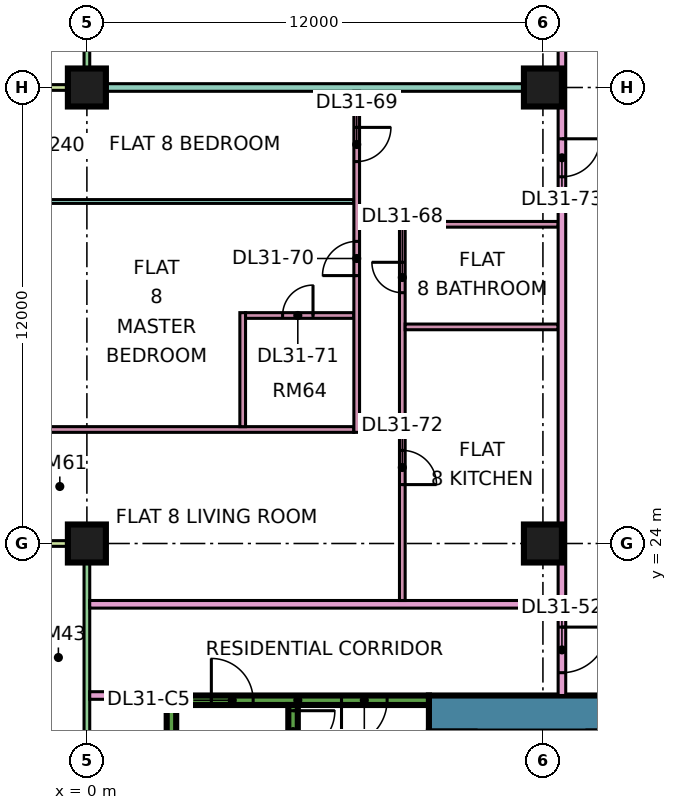
"""IFC4 building model, lengths in metres.
Left out: names, types, materials, properties, quantities, classifications, styles, units other than length and angle.
Written with IfcOpenShell. Run it as: python <this file> out.ifc"""

import sys

from ifc_helpers import new_model, si_unit, direction, frame, frame_2d, origin, origin_2d, place, context, subcontext, project, spatial, rectangle, extrude, element, fill, save


model = new_model("IFC4")
c1 = context("Model", 3, precision=1e-05, world=origin(), true_north=direction((0.0, 1.0)))
c2 = subcontext(c1, "Body", "Model", "MODEL_VIEW")
j1 = project(units=[si_unit("LENGTHUNIT", "METRE"), si_unit("PLANEANGLEUNIT", "RADIAN")], contexts=[c1])
p1 = place(None, origin())
s1 = spatial("IfcSite", under=j1, at=p1, CompositionType="ELEMENT")
p2 = place(p1, origin())
s2 = spatial("IfcBuilding", under=s1, at=p2, CompositionType="ELEMENT")
p3 = place(p2, frame((0.0, 0.0, 133.15)))
s3 = spatial("IfcBuildingStorey", under=s2, at=p3, CompositionType="ELEMENT", Elevation=133.15)
p4 = place(p3, frame((0.0, 24.0, 0.0), z_axis=(0.0, 0.0, 1.0), x_axis=(1.0, 0.0, 0.0)))
e1 = element("IfcColumn", 1, at=p4, inside=s3, PredefinedType="COLUMN", context=c2, shape_type="SweptSolid", body=[
    extrude(rectangle(XDim=1.0, YDim=1.0, at=origin_2d()), origin(), (0.0, 0.0, 1.0), 3.75),
])
p5 = place(p3, frame((0.0, 36.0, 0.0), z_axis=(0.0, 0.0, 1.0), x_axis=(1.0, 0.0, 0.0)))
e2 = element("IfcColumn", 2, at=p5, inside=s3, PredefinedType="COLUMN", context=c2, shape_type="SweptSolid", body=[
    extrude(rectangle(XDim=1.0, YDim=1.0, at=origin_2d()), origin(), (0.0, 0.0, 1.0), 3.75),
])
for number, where, z_axis, x_axis in (
    (3, (12.0, 24.0, 0.0), (0.0, 0.0, 1.0), (1.0, 0.0, 0.0)),
    (4, (12.0, 36.0, 0.0), (0.0, 0.0, 1.0), (1.0, 0.0, 0.0)),
):
    element("IfcColumn", number, at=place(p3, frame(where, z_axis=z_axis, x_axis=x_axis)), inside=s3, PredefinedType="COLUMN", context=c2, shape_type="SweptSolid", body=[
        extrude(rectangle(XDim=1.0, YDim=1.0, at=origin_2d()), origin(), (0.0, 0.0, 1.0), 3.75),
    ])
p6 = place(p3, frame((9.0, 19.525, 0.0), z_axis=(0.0, 0.0, 1.0), x_axis=(1.0, 0.0, 0.0)))
e5 = element("IfcWall", 5, at=p6, inside=s3, PredefinedType="SHEAR", context=c2, shape_type="SweptSolid", body=[
    extrude(rectangle(XDim=25.0, YDim=0.95, at=frame_2d((12.5, 0.0))), origin(), (0.0, 0.0, 1.0), 3.75),
])
p7 = place(p6, frame((19.1, 0.0, 0.0)))
e6 = element("IfcOpeningElement", 6, at=p7, cuts=e5, PredefinedType="OPENING", context=c2, shape_type="SweptSolid", body=[
    extrude(rectangle(XDim=1.8, YDim=2.4, at=frame_2d((0.9, 1.2))), frame((0.0, 0.485, 0.0), z_axis=(0.0, -1.0, 0.0), x_axis=(1.0, 0.0, 0.0)), (0.0, 0.0, 1.0), 0.97),
])
p8 = place(p3, frame((2.1, 19.875, 0.0), z_axis=(0.0, 0.0, 1.0), x_axis=(1.0, 0.0, 0.0)))
e7 = element("IfcWall", 7, at=p8, inside=s3, PredefinedType="SHEAR", context=c2, shape_type="SweptSolid", body=[
    extrude(rectangle(XDim=6.9, YDim=0.25, at=frame_2d((3.45, 0.0))), origin(), (0.0, 0.0, 1.0), 3.75),
])
p9 = place(p8, frame((1.175, 0.0, 0.0)))
e8 = element("IfcOpeningElement", 8, at=p9, cuts=e7, PredefinedType="OPENING", context=c2, shape_type="SweptSolid", body=[
    extrude(rectangle(XDim=1.1, YDim=2.2, at=frame_2d((0.55, 1.1))), frame((0.0, 0.135, 0.0), z_axis=(0.0, -1.0, 0.0), x_axis=(1.0, 0.0, 0.0)), (0.0, 0.0, 1.0), 0.27),
])
p10 = place(p8, frame((4.6, 0.0, 0.0)))
e9 = element("IfcOpeningElement", 9, at=p10, cuts=e7, PredefinedType="OPENING", context=c2, shape_type="SweptSolid", body=[
    extrude(rectangle(XDim=1.2, YDim=2.2, at=frame_2d((0.6, 1.1))), frame((0.0, 0.135, 0.0), z_axis=(0.0, -1.0, 0.0), x_axis=(1.0, 0.0, 0.0)), (0.0, 0.0, 1.0), 0.27),
])
p11 = place(p3, frame((2.225, 13.25, 0.0), z_axis=(0.0, 0.0, 1.0), x_axis=(0.0, 1.0, 0.0)))
e10 = element("IfcWall", 10, at=p11, inside=s3, PredefinedType="SHEAR", context=c2, shape_type="SweptSolid", body=[
    extrude(rectangle(XDim=6.5, YDim=0.25, at=frame_2d((3.25, 0.0))), origin(), (0.0, 0.0, 1.0), 3.75),
])
p12 = place(p3, frame((5.425, 13.25, 0.0), z_axis=(0.0, 0.0, 1.0), x_axis=(0.0, 1.0, 0.0)))
e11 = element("IfcWall", 11, at=p12, inside=s3, PredefinedType="SHEAR", context=c2, shape_type="SweptSolid", body=[
    extrude(rectangle(XDim=6.5, YDim=0.25, at=frame_2d((3.25, 0.0))), origin(), (0.0, 0.0, 1.0), 3.75),
])
p13 = place(p12, frame((5.25, 0.0, 0.0)))
e12 = element("IfcOpeningElement", 12, at=p13, cuts=e11, PredefinedType="OPENING", context=c2, shape_type="SweptSolid", body=[
    extrude(rectangle(XDim=1.1, YDim=2.2, at=frame_2d((0.55, 1.1))), frame((0.0, 0.135, 0.0), z_axis=(0.0, -1.0, 0.0), x_axis=(1.0, 0.0, 0.0)), (0.0, 0.0, 1.0), 0.27),
])
p14 = place(p3, frame((0.0, 47.925, 0.0), z_axis=(0.0, 0.0, 1.0), x_axis=(0.0, -1.0, 0.0)))
e13 = element("IfcWall", 13, at=p14, inside=s3, PredefinedType="SOLIDWALL", context=c2, shape_type="SweptSolid", body=[
    extrude(rectangle(XDim=11.85, YDim=0.15, at=frame_2d((5.925, 0.0))), origin(), (0.0, 0.0, 1.0), 3.35),
])
p15 = place(p14, frame((0.562, 0.0, 0.45)))
e14 = element("IfcOpeningElement", 14, at=p15, cuts=e13, PredefinedType="OPENING", context=c2, shape_type="SweptSolid", body=[
    extrude(rectangle(XDim=1.2, YDim=2.4, at=frame_2d((0.6, 1.2))), frame((0.0, 0.085, 0.0), z_axis=(0.0, -1.0, 0.0), x_axis=(1.0, 0.0, 0.0)), (0.0, 0.0, 1.0), 0.17),
])
p16 = place(p14, frame((4.125, 0.0, 0.0)))
e15 = element("IfcOpeningElement", 15, at=p16, cuts=e13, PredefinedType="OPENING", context=c2, shape_type="SweptSolid", body=[
    extrude(rectangle(XDim=1.2, YDim=2.4, at=frame_2d((0.6, 1.2))), frame((0.0, 0.085, 0.0), z_axis=(0.0, -1.0, 0.0), x_axis=(1.0, 0.0, 0.0)), (0.0, 0.0, 1.0), 0.17),
])
p17 = place(p14, frame((7.125, 0.0, 0.45)))
e16 = element("IfcOpeningElement", 16, at=p17, cuts=e13, PredefinedType="OPENING", context=c2, shape_type="SweptSolid", body=[
    extrude(rectangle(XDim=3.0, YDim=2.4, at=frame_2d((1.5, 1.2))), frame((0.0, 0.085, 0.0), z_axis=(0.0, -1.0, 0.0), x_axis=(1.0, 0.0, 0.0)), (0.0, 0.0, 1.0), 0.17),
])
p18 = place(p3, frame((-1.5, 36.0, 0.0), z_axis=(0.0, 0.0, 1.0), x_axis=(1.0, 0.0, 0.0)))
e17 = element("IfcWall", 17, at=p18, inside=s3, PredefinedType="SOLIDWALL", context=c2, shape_type="SweptSolid", body=[
    extrude(rectangle(XDim=1.5, YDim=0.15, at=frame_2d((0.75, 0.0))), origin(), (0.0, 0.0, 1.0), 3.35),
])
p19 = place(p3, frame((0.0, 23.925, 0.0), z_axis=(0.0, 0.0, 1.0), x_axis=(0.0, -1.0, 0.0)))
e18 = element("IfcWall", 18, at=p19, inside=s3, PredefinedType="SOLIDWALL", context=c2, shape_type="SweptSolid", body=[
    extrude(rectangle(XDim=11.35, YDim=0.15, at=frame_2d((5.675, 0.0))), origin(), (0.0, 0.0, 1.0), 3.35),
])
p20 = place(p19, frame((6.738, 0.0, 0.0)))
e19 = element("IfcOpeningElement", 19, at=p20, cuts=e18, PredefinedType="OPENING", context=c2, shape_type="SweptSolid", body=[
    extrude(rectangle(XDim=1.8, YDim=2.4, at=frame_2d((0.9, 1.2))), frame((0.0, 0.085, 0.0), z_axis=(0.0, -1.0, 0.0), x_axis=(1.0, 0.0, 0.0)), (0.0, 0.0, 1.0), 0.17),
])
p21 = place(p3, frame((-1.5, 24.0, 0.0), z_axis=(0.0, 0.0, 1.0), x_axis=(1.0, 0.0, 0.0)))
e20 = element("IfcWall", 20, at=p21, inside=s3, PredefinedType="SOLIDWALL", context=c2, shape_type="SweptSolid", body=[
    extrude(rectangle(XDim=1.5, YDim=0.15, at=frame_2d((0.75, 0.0))), origin(), (0.0, 0.0, 1.0), 3.35),
])
p22 = place(p3, frame((-1.351, 33.0, 0.0), z_axis=(0.0, 0.0, 1.0), x_axis=(1.0, 0.0, 0.0)))
e21 = element("IfcWall", 21, at=p22, inside=s3, PredefinedType="PARTITIONING", context=c2, shape_type="SweptSolid", body=[
    extrude(rectangle(XDim=8.376, YDim=0.1, at=frame_2d((4.188, 0.0))), origin(), (0.0, 0.0, 1.0), 3.35),
])
p23 = place(p3, frame((-1.35, 27.0, 0.0), z_axis=(0.0, 0.0, 1.0), x_axis=(1.0, 0.0, 0.0)))
e22 = element("IfcWall", 22, at=p23, inside=s3, PredefinedType="PARTITIONING", context=c2, shape_type="SweptSolid", body=[
    extrude(rectangle(XDim=8.375, YDim=0.15, at=frame_2d((4.188, 0.0))), origin(), (0.0, 0.0, 1.0), 3.35),
])
e23 = element("IfcWall", 23, at=p5, inside=s3, PredefinedType="PARTITIONING", context=c2, shape_type="SweptSolid", body=[
    extrude(rectangle(XDim=12.4, YDim=0.2, at=frame_2d((6.2, 0.0))), origin(), (0.0, 0.0, 1.0), 3.35),
])
p24 = place(p3, frame((0.074, 20.0, 0.0), z_axis=(0.0, 0.0, 1.0), x_axis=(1.0, 0.0, 0.0)))
e24 = element("IfcWall", 24, at=p24, inside=s3, PredefinedType="PARTITIONING", context=c2, shape_type="SweptSolid", body=[
    extrude(rectangle(XDim=2.026, YDim=0.2, at=frame_2d((1.013, 0.0))), origin(), (0.0, 0.0, 1.0), 3.35),
])
p25 = place(p3, frame((0.074, 22.4, 0.0), z_axis=(0.0, 0.0, 1.0), x_axis=(1.0, 0.0, 0.0)))
e25 = element("IfcWall", 25, at=p25, inside=s3, PredefinedType="PARTITIONING", context=c2, shape_type="SweptSolid", body=[
    extrude(rectangle(XDim=12.326, YDim=0.2, at=frame_2d((6.163, 0.0))), origin(), (0.0, 0.0, 1.0), 3.35),
])
p26 = place(p3, frame((4.1, 27.075, 0.0), z_axis=(0.0, 0.0, 1.0), x_axis=(0.0, 1.0, 0.0)))
e26 = element("IfcWall", 26, at=p26, inside=s3, PredefinedType="PARTITIONING", context=c2, shape_type="SweptSolid", body=[
    extrude(rectangle(XDim=3.0, YDim=0.15, at=frame_2d((1.5, 0.0))), origin(), (0.0, 0.0, 1.0), 3.35),
])
p27 = place(p3, frame((4.175, 30.0, 0.0), z_axis=(0.0, 0.0, 1.0), x_axis=(1.0, 0.0, 0.0)))
e27 = element("IfcWall", 27, at=p27, inside=s3, PredefinedType="PARTITIONING", context=c2, shape_type="SweptSolid", body=[
    extrude(rectangle(XDim=2.85, YDim=0.15, at=frame_2d((1.425, 0.0))), origin(), (0.0, 0.0, 1.0), 3.35),
])
p28 = place(p27, frame((0.975, 0.0, 0.0)))
e28 = element("IfcOpeningElement", 28, at=p28, cuts=e27, PredefinedType="OPENING", context=c2, shape_type="SweptSolid", body=[
    extrude(rectangle(XDim=0.8, YDim=2.1, at=frame_2d((0.4, 1.05))), frame((0.0, 0.085, 0.0), z_axis=(0.0, -1.0, 0.0), x_axis=(1.0, 0.0, 0.0)), (0.0, 0.0, 1.0), 0.17),
])
p29 = place(p3, frame((7.1, 26.925, 0.0), z_axis=(0.0, 0.0, 1.0), x_axis=(0.0, 1.0, 0.0)))
e29 = element("IfcWall", 29, at=p29, inside=s3, PredefinedType="PARTITIONING", context=c2, shape_type="SweptSolid", body=[
    extrude(rectangle(XDim=8.975, YDim=0.15, at=frame_2d((4.487, 0.0))), origin(), (0.0, 0.0, 1.0), 3.35),
])
p30 = place(p29, frame((7.125, 0.0, 0.0)))
e30 = element("IfcOpeningElement", 30, at=p30, cuts=e29, PredefinedType="OPENING", context=c2, shape_type="SweptSolid", body=[
    extrude(rectangle(XDim=0.9, YDim=2.1, at=frame_2d((0.45, 1.05))), frame((0.0, 0.085, 0.0), z_axis=(0.0, -1.0, 0.0), x_axis=(1.0, 0.0, 0.0)), (0.0, 0.0, 1.0), 0.17),
])
p31 = place(p29, frame((4.125, 0.0, 0.0)))
e31 = element("IfcOpeningElement", 31, at=p31, cuts=e29, PredefinedType="OPENING", context=c2, shape_type="SweptSolid", body=[
    extrude(rectangle(XDim=0.9, YDim=2.1, at=frame_2d((0.45, 1.05))), frame((0.0, 0.085, 0.0), z_axis=(0.0, -1.0, 0.0), x_axis=(1.0, 0.0, 0.0)), (0.0, 0.0, 1.0), 0.17),
])
p32 = place(p3, frame((8.3, 22.5, 0.0), z_axis=(0.0, 0.0, 1.0), x_axis=(0.0, 1.0, 0.0)))
e32 = element("IfcWall", 32, at=p32, inside=s3, PredefinedType="PARTITIONING", context=c2, shape_type="SweptSolid", body=[
    extrude(rectangle(XDim=9.975, YDim=0.15, at=frame_2d((4.988, 0.0))), origin(), (0.0, 0.0, 1.0), 3.35),
])
p33 = place(p32, frame((8.1, 0.0, 0.0)))
e33 = element("IfcOpeningElement", 33, at=p33, cuts=e32, PredefinedType="OPENING", context=c2, shape_type="SweptSolid", body=[
    extrude(rectangle(XDim=0.8, YDim=2.1, at=frame_2d((0.4, 1.05))), frame((0.0, 0.085, 0.0), z_axis=(0.0, -1.0, 0.0), x_axis=(1.0, 0.0, 0.0)), (0.0, 0.0, 1.0), 0.17),
])
p34 = place(p32, frame((3.05, 0.0, 0.0)))
e34 = element("IfcOpeningElement", 34, at=p34, cuts=e32, PredefinedType="OPENING", context=c2, shape_type="SweptSolid", body=[
    extrude(rectangle(XDim=0.9, YDim=2.1, at=frame_2d((0.45, 1.05))), frame((0.0, 0.085, 0.0), z_axis=(0.0, -1.0, 0.0), x_axis=(1.0, 0.0, 0.0)), (0.0, 0.0, 1.0), 0.17),
])
for number, where, z_axis, x_axis in (
    (35, (8.375, 29.7, 0.0), (0.0, 0.0, 1.0), (1.0, 0.0, 0.0)),
    (36, (8.375, 32.4, 0.0), (0.0, 0.0, 1.0), (1.0, 0.0, 0.0)),
):
    element("IfcWall", number, at=place(p3, frame(where, z_axis=z_axis, x_axis=x_axis)), inside=s3, PredefinedType="PARTITIONING", context=c2, shape_type="SweptSolid", body=[
        extrude(rectangle(XDim=4.025, YDim=0.15, at=frame_2d((2.012, 0.0))), origin(), (0.0, 0.0, 1.0), 3.35),
    ])
p35 = place(p3, frame((12.5, 20.0, 0.0), z_axis=(0.0, 0.0, 1.0), x_axis=(0.0, 1.0, 0.0)))
e37 = element("IfcWall", 37, at=p35, inside=s3, PredefinedType="PARTITIONING", context=c2, shape_type="SweptSolid", body=[
    extrude(rectangle(XDim=42.926, YDim=0.2, at=frame_2d((21.463, 0.0))), origin(), (0.0, 0.0, 1.0), 3.35),
])
p36 = place(p35, frame((17.25, 0.0, 0.0)))
e38 = element("IfcOpeningElement", 38, at=p36, cuts=e37, PredefinedType="OPENING", context=c2, shape_type="SweptSolid", body=[
    extrude(rectangle(XDim=1.0, YDim=2.1, at=frame_2d((0.5, 1.05))), frame((0.0, 0.11, 0.0), z_axis=(0.0, -1.0, 0.0), x_axis=(1.0, 0.0, 0.0)), (0.0, 0.0, 1.0), 0.22),
])
p37 = place(p35, frame((40.8, 0.0, 0.0)))
e39 = element("IfcOpeningElement", 39, at=p37, cuts=e37, PredefinedType="OPENING", context=c2, shape_type="SweptSolid", body=[
    extrude(rectangle(XDim=1.0, YDim=2.1, at=frame_2d((0.5, 1.05))), frame((0.0, 0.11, 0.0), z_axis=(0.0, -1.0, 0.0), x_axis=(1.0, 0.0, 0.0)), (0.0, 0.0, 1.0), 0.22),
])
p38 = place(p35, frame((0.6, 0.0, 0.0)))
e40 = element("IfcOpeningElement", 40, at=p38, cuts=e37, PredefinedType="OPENING", context=c2, shape_type="SweptSolid", body=[
    extrude(rectangle(XDim=1.2, YDim=2.1, at=frame_2d((0.6, 1.05))), frame((0.0, 0.11, 0.0), z_axis=(0.0, -1.0, 0.0), x_axis=(1.0, 0.0, 0.0)), (0.0, 0.0, 1.0), 0.22),
])
p39 = place(p35, frame((13.65, 0.0, 0.0)))
e41 = element("IfcOpeningElement", 41, at=p39, cuts=e37, PredefinedType="OPENING", context=c2, shape_type="SweptSolid", body=[
    extrude(rectangle(XDim=1.0, YDim=2.1, at=frame_2d((0.5, 1.05))), frame((0.0, 0.11, 0.0), z_axis=(0.0, -1.0, 0.0), x_axis=(1.0, 0.0, 0.0)), (0.0, 0.0, 1.0), 0.22),
])
p40 = place(p13, origin())
e42 = element("IfcDoor", 42, at=p40, inside=s3, OperationType="SINGLE_SWING_RIGHT", PredefinedType="DOOR", context=c2, shape_type="SweptSolid", body=[
    extrude(rectangle(XDim=1.1, YDim=2.2, at=frame_2d((0.55, 1.1))), frame((0.0, 0.025, 0.0), z_axis=(0.0, -1.0, 0.0), x_axis=(1.0, 0.0, 0.0)), (0.0, 0.0, 1.0), 0.05),
])
fill(e12, e42)
p41 = place(p9, origin())
e43 = element("IfcDoor", 43, at=p41, inside=s3, OperationType="SINGLE_SWING_LEFT", PredefinedType="DOOR", context=c2, shape_type="SweptSolid", body=[
    extrude(rectangle(XDim=1.1, YDim=2.2, at=frame_2d((0.55, 1.1))), frame((0.0, 0.025, 0.0), z_axis=(0.0, -1.0, 0.0), x_axis=(1.0, 0.0, 0.0)), (0.0, 0.0, 1.0), 0.05),
])
fill(e8, e43)
p42 = place(p10, frame((1.2, 0.0, 0.0), z_axis=(0.0, 0.0, 1.0), x_axis=(-1.0, 0.0, 0.0)))
e44 = element("IfcDoor", 44, at=p42, inside=s3, OperationType="SINGLE_SWING_LEFT", PredefinedType="DOOR", context=c2, shape_type="SweptSolid", body=[
    extrude(rectangle(XDim=1.2, YDim=2.2, at=frame_2d((0.6, 1.1))), frame((0.0, 0.025, 0.0), z_axis=(0.0, -1.0, 0.0), x_axis=(1.0, 0.0, 0.0)), (0.0, 0.0, 1.0), 0.05),
])
fill(e9, e44)
p43 = place(p38, origin())
e45 = element("IfcDoor", 45, at=p43, inside=s3, OperationType="SINGLE_SWING_RIGHT", PredefinedType="DOOR", context=c2, shape_type="SweptSolid", body=[
    extrude(rectangle(XDim=1.2, YDim=2.1, at=frame_2d((0.6, 1.05))), frame((0.0, 0.025, 0.0), z_axis=(0.0, -1.0, 0.0), x_axis=(1.0, 0.0, 0.0)), (0.0, 0.0, 1.0), 0.05),
])
fill(e40, e45)
p44 = place(p33, frame((0.8, 0.0, 0.0), z_axis=(0.0, 0.0, 1.0), x_axis=(-1.0, 0.0, 0.0)))
e46 = element("IfcDoor", 46, at=p44, inside=s3, OperationType="SINGLE_SWING_RIGHT", PredefinedType="DOOR", context=c2, shape_type="SweptSolid", body=[
    extrude(rectangle(XDim=0.8, YDim=2.1, at=frame_2d((0.4, 1.05))), frame((0.0, 0.025, 0.0), z_axis=(0.0, -1.0, 0.0), x_axis=(1.0, 0.0, 0.0)), (0.0, 0.0, 1.0), 0.05),
])
fill(e33, e46)
p45 = place(p30, origin())
e47 = element("IfcDoor", 47, at=p45, inside=s3, OperationType="SINGLE_SWING_RIGHT", PredefinedType="DOOR", context=c2, shape_type="SweptSolid", body=[
    extrude(rectangle(XDim=0.9, YDim=2.1, at=frame_2d((0.45, 1.05))), frame((0.0, 0.025, 0.0), z_axis=(0.0, -1.0, 0.0), x_axis=(1.0, 0.0, 0.0)), (0.0, 0.0, 1.0), 0.05),
])
fill(e30, e47)
p46 = place(p31, origin())
e48 = element("IfcDoor", 48, at=p46, inside=s3, OperationType="SINGLE_SWING_LEFT", PredefinedType="DOOR", context=c2, shape_type="SweptSolid", body=[
    extrude(rectangle(XDim=0.9, YDim=2.1, at=frame_2d((0.45, 1.05))), frame((0.0, 0.025, 0.0), z_axis=(0.0, -1.0, 0.0), x_axis=(1.0, 0.0, 0.0)), (0.0, 0.0, 1.0), 0.05),
])
fill(e31, e48)
p47 = place(p28, frame((0.8, 0.0, 0.0), z_axis=(0.0, 0.0, 1.0), x_axis=(-1.0, 0.0, 0.0)))
e49 = element("IfcDoor", 49, at=p47, inside=s3, OperationType="SINGLE_SWING_RIGHT", PredefinedType="DOOR", context=c2, shape_type="SweptSolid", body=[
    extrude(rectangle(XDim=0.8, YDim=2.1, at=frame_2d((0.4, 1.05))), frame((0.0, 0.025, 0.0), z_axis=(0.0, -1.0, 0.0), x_axis=(1.0, 0.0, 0.0)), (0.0, 0.0, 1.0), 0.05),
])
fill(e28, e49)
p48 = place(p34, frame((0.9, 0.0, 0.0), z_axis=(0.0, 0.0, 1.0), x_axis=(-1.0, 0.0, 0.0)))
e50 = element("IfcDoor", 50, at=p48, inside=s3, OperationType="SINGLE_SWING_LEFT", PredefinedType="DOOR", context=c2, shape_type="SweptSolid", body=[
    extrude(rectangle(XDim=0.9, YDim=2.1, at=frame_2d((0.45, 1.05))), frame((0.0, 0.025, 0.0), z_axis=(0.0, -1.0, 0.0), x_axis=(1.0, 0.0, 0.0)), (0.0, 0.0, 1.0), 0.05),
])
fill(e34, e50)
p49 = place(p39, origin())
e51 = element("IfcDoor", 51, at=p49, inside=s3, OperationType="SINGLE_SWING_RIGHT", PredefinedType="DOOR", context=c2, shape_type="SweptSolid", body=[
    extrude(rectangle(XDim=1.0, YDim=2.1, at=frame_2d((0.5, 1.05))), frame((0.0, 0.025, 0.0), z_axis=(0.0, -1.0, 0.0), x_axis=(1.0, 0.0, 0.0)), (0.0, 0.0, 1.0), 0.05),
])
fill(e41, e51)
save(model, sys.argv[1])
